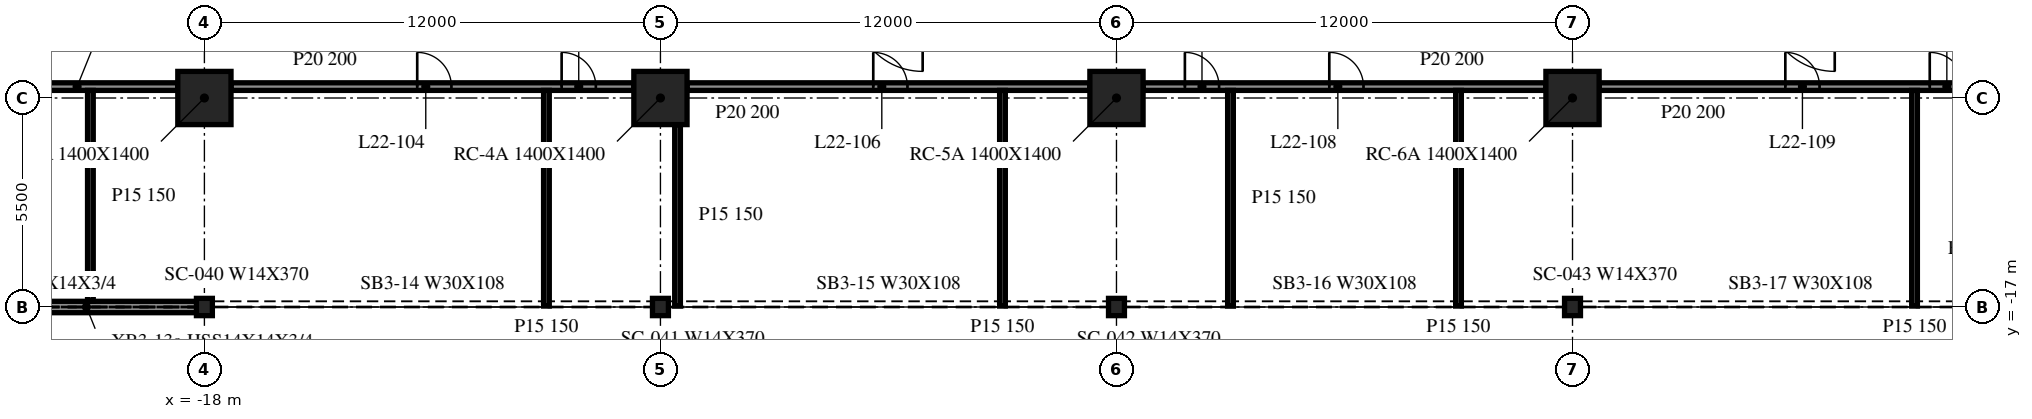
"""IFC4 building model, lengths in metres.
Left out: names, types, materials, properties, quantities, classifications, styles, units other than length and angle.
Written with IfcOpenShell. Run it as: python <this file> out.ifc"""

import sys

from ifc_helpers import new_model, si_unit, direction, frame, frame_2d, origin, origin_2d, place, context, subcontext, project, spatial, rectangle, i_section, extrude, element, fill, save


model = new_model("IFC4")
c1 = context("Model", 3, precision=1e-05, world=origin(), true_north=direction((0.0, 1.0)))
c2 = subcontext(c1, "Body", "Model", "MODEL_VIEW")
j1 = project(units=[si_unit("LENGTHUNIT", "METRE"), si_unit("PLANEANGLEUNIT", "RADIAN")], contexts=[c1])
p1 = place(None, origin())
s1 = spatial("IfcSite", under=j1, at=p1, CompositionType="ELEMENT")
p2 = place(p1, origin())
s2 = spatial("IfcBuilding", under=s1, at=p2, CompositionType="ELEMENT")
p3 = place(p2, frame((0.0, 0.0, 97.1)))
s3 = spatial("IfcBuildingStorey", under=s2, at=p3, CompositionType="ELEMENT", Elevation=97.1)
for number, where, z_axis, x_axis in (
    (1, (-18.0, -11.5, -0.34), (0.0, 0.0, 1.0), (1.0, 0.0, 0.0)),
    (2, (-6.0, -11.5, -0.34), (0.0, 0.0, 1.0), (1.0, 0.0, 0.0)),
    (3, (6.0, -11.5, -0.34), (0.0, 0.0, 1.0), (1.0, 0.0, 0.0)),
    (4, (18.0, -11.5, -0.34), (0.0, 0.0, 1.0), (1.0, 0.0, 0.0)),
):
    element("IfcColumn", number, at=place(p3, frame(where, z_axis=z_axis, x_axis=x_axis)), inside=s3, PredefinedType="COLUMN", context=c2, shape_type="SweptSolid", body=[
        extrude(rectangle(XDim=1.4, YDim=1.4, at=origin_2d()), origin(), (0.0, 0.0, 1.0), 4.1),
    ])
for number, where, z_axis, x_axis in (
    (5, (-18.0, -17.0, -0.34), (0.0, 0.0, 1.0), (1.0, 0.0, 0.0)),
    (6, (-6.0, -17.0, -0.34), (0.0, 0.0, 1.0), (1.0, 0.0, 0.0)),
    (7, (6.0, -17.0, -0.34), (0.0, 0.0, 1.0), (1.0, 0.0, 0.0)),
    (8, (18.0, -17.0, -0.34), (0.0, 0.0, 1.0), (1.0, 0.0, 0.0)),
):
    element("IfcColumn", number, at=place(p3, frame(where, z_axis=z_axis, x_axis=x_axis)), inside=s3, PredefinedType="COLUMN", context=c2, shape_type="SweptSolid", body=[
        extrude(i_section(OverallWidth=0.419, OverallDepth=0.455, WebThickness=0.042, FlangeThickness=0.068, at=origin_2d()), origin(), (0.0, 0.0, 1.0), 4.1),
    ])
p4 = place(p3, frame((-29.979, -17.0, 0.0), z_axis=(0.0, 0.0, 1.0), x_axis=(1.0, 0.0, 0.0)))
e9 = element("IfcWall", 9, at=p4, inside=s3, PredefinedType="NOTDEFINED", context=c2, shape_type="SweptSolid", body=[
    extrude(rectangle(XDim=11.958, YDim=0.3, at=frame_2d((5.979, 0.0))), origin(), (0.0, 0.0, 1.0), 3.003),
])
p5 = place(p3, frame((-29.3, -11.2, 0.0), z_axis=(0.0, 0.0, 1.0), x_axis=(1.0, 0.0, 0.0)))
e10 = element("IfcWall", 10, at=p5, inside=s3, PredefinedType="PARTITIONING", context=c2, shape_type="SweptSolid", body=[
    extrude(rectangle(XDim=10.6, YDim=0.2, at=frame_2d((5.3, 0.0))), origin(), (0.0, 0.0, 1.0), 3.76),
])
p6 = place(p5, frame((1.5, 0.0, 0.0)))
e11 = element("IfcOpeningElement", 11, at=p6, cuts=e10, PredefinedType="OPENING", context=c2, shape_type="SweptSolid", body=[
    extrude(rectangle(XDim=0.9, YDim=2.1, at=frame_2d((0.45, 1.05))), frame((0.0, 0.11, 0.0), z_axis=(0.0, -1.0, 0.0), x_axis=(1.0, 0.0, 0.0)), (0.0, 0.0, 1.0), 0.22),
])
p7 = place(p5, frame((4.9, 0.0, 0.0)))
e12 = element("IfcOpeningElement", 12, at=p7, cuts=e10, PredefinedType="OPENING", context=c2, shape_type="SweptSolid", body=[
    extrude(rectangle(XDim=0.9, YDim=2.1, at=frame_2d((0.45, 1.05))), frame((0.0, 0.11, 0.0), z_axis=(0.0, -1.0, 0.0), x_axis=(1.0, 0.0, 0.0)), (0.0, 0.0, 1.0), 0.22),
])
p8 = place(p3, frame((-17.3, -11.2, 0.0), z_axis=(0.0, 0.0, 1.0), x_axis=(1.0, 0.0, 0.0)))
e13 = element("IfcWall", 13, at=p8, inside=s3, PredefinedType="PARTITIONING", context=c2, shape_type="SweptSolid", body=[
    extrude(rectangle(XDim=10.6, YDim=0.2, at=frame_2d((5.3, 0.0))), origin(), (0.0, 0.0, 1.0), 3.76),
])
p9 = place(p8, frame((4.9, 0.0, 0.0)))
e14 = element("IfcOpeningElement", 14, at=p9, cuts=e13, PredefinedType="OPENING", context=c2, shape_type="SweptSolid", body=[
    extrude(rectangle(XDim=0.9, YDim=2.1, at=frame_2d((0.45, 1.05))), frame((0.0, 0.11, 0.0), z_axis=(0.0, -1.0, 0.0), x_axis=(1.0, 0.0, 0.0)), (0.0, 0.0, 1.0), 0.22),
])
p10 = place(p8, frame((8.7, 0.0, 0.0)))
e15 = element("IfcOpeningElement", 15, at=p10, cuts=e13, PredefinedType="OPENING", context=c2, shape_type="SweptSolid", body=[
    extrude(rectangle(XDim=0.9, YDim=2.1, at=frame_2d((0.45, 1.05))), frame((0.0, 0.11, 0.0), z_axis=(0.0, -1.0, 0.0), x_axis=(1.0, 0.0, 0.0)), (0.0, 0.0, 1.0), 0.22),
])
p11 = place(p3, frame((-5.3, -11.2, 0.0), z_axis=(0.0, 0.0, 1.0), x_axis=(1.0, 0.0, 0.0)))
e16 = element("IfcWall", 16, at=p11, inside=s3, PredefinedType="PARTITIONING", context=c2, shape_type="SweptSolid", body=[
    extrude(rectangle(XDim=10.6, YDim=0.2, at=frame_2d((5.3, 0.0))), origin(), (0.0, 0.0, 1.0), 3.76),
])
p12 = place(p11, frame((4.9, 0.0, 0.0)))
e17 = element("IfcOpeningElement", 17, at=p12, cuts=e16, PredefinedType="OPENING", context=c2, shape_type="SweptSolid", body=[
    extrude(rectangle(XDim=0.9, YDim=2.1, at=frame_2d((0.45, 1.05))), frame((0.0, 0.11, 0.0), z_axis=(0.0, -1.0, 0.0), x_axis=(1.0, 0.0, 0.0)), (0.0, 0.0, 1.0), 0.22),
])
p13 = place(p3, frame((6.7, -11.2, 0.0), z_axis=(0.0, 0.0, 1.0), x_axis=(1.0, 0.0, 0.0)))
e18 = element("IfcWall", 18, at=p13, inside=s3, PredefinedType="PARTITIONING", context=c2, shape_type="SweptSolid", body=[
    extrude(rectangle(XDim=10.6, YDim=0.2, at=frame_2d((5.3, 0.0))), origin(), (0.0, 0.0, 1.0), 3.76),
])
p14 = place(p13, frame((1.1, 0.0, 0.0)))
e19 = element("IfcOpeningElement", 19, at=p14, cuts=e18, PredefinedType="OPENING", context=c2, shape_type="SweptSolid", body=[
    extrude(rectangle(XDim=0.9, YDim=2.1, at=frame_2d((0.45, 1.05))), frame((0.0, 0.11, 0.0), z_axis=(0.0, -1.0, 0.0), x_axis=(1.0, 0.0, 0.0)), (0.0, 0.0, 1.0), 0.22),
])
p15 = place(p13, frame((4.9, 0.0, 0.0)))
e20 = element("IfcOpeningElement", 20, at=p15, cuts=e18, PredefinedType="OPENING", context=c2, shape_type="SweptSolid", body=[
    extrude(rectangle(XDim=0.9, YDim=2.1, at=frame_2d((0.45, 1.05))), frame((0.0, 0.11, 0.0), z_axis=(0.0, -1.0, 0.0), x_axis=(1.0, 0.0, 0.0)), (0.0, 0.0, 1.0), 0.22),
])
p16 = place(p3, frame((18.7, -11.2, 0.0), z_axis=(0.0, 0.0, 1.0), x_axis=(1.0, 0.0, 0.0)))
e21 = element("IfcWall", 21, at=p16, inside=s3, PredefinedType="PARTITIONING", context=c2, shape_type="SweptSolid", body=[
    extrude(rectangle(XDim=10.6, YDim=0.2, at=frame_2d((5.3, 0.0))), origin(), (0.0, 0.0, 1.0), 3.76),
])
p17 = place(p16, frame((4.9, 0.0, 0.0)))
e22 = element("IfcOpeningElement", 22, at=p17, cuts=e21, PredefinedType="OPENING", context=c2, shape_type="SweptSolid", body=[
    extrude(rectangle(XDim=0.9, YDim=2.1, at=frame_2d((0.45, 1.05))), frame((0.0, 0.11, 0.0), z_axis=(0.0, -1.0, 0.0), x_axis=(1.0, 0.0, 0.0)), (0.0, 0.0, 1.0), 0.22),
])
p18 = place(p16, frame((8.7, 0.0, 0.0)))
e23 = element("IfcOpeningElement", 23, at=p18, cuts=e21, PredefinedType="OPENING", context=c2, shape_type="SweptSolid", body=[
    extrude(rectangle(XDim=0.9, YDim=2.1, at=frame_2d((0.45, 1.05))), frame((0.0, 0.11, 0.0), z_axis=(0.0, -1.0, 0.0), x_axis=(1.0, 0.0, 0.0)), (0.0, 0.0, 1.0), 0.22),
])
p19 = place(p3, frame((-21.0, -16.85, 0.0), z_axis=(0.0, 0.0, 1.0), x_axis=(0.0, 1.0, 0.0)))
e24 = element("IfcWall", 24, at=p19, inside=s3, PredefinedType="PARTITIONING", context=c2, shape_type="SweptSolid", body=[
    extrude(rectangle(XDim=5.55, YDim=0.15, at=frame_2d((2.775, 0.0))), origin(), (0.0, 0.0, 1.0), 3.76),
])
p20 = place(p3, frame((-9.0, -16.975, 0.0), z_axis=(0.0, 0.0, 1.0), x_axis=(0.0, 1.0, 0.0)))
e25 = element("IfcWall", 25, at=p20, inside=s3, PredefinedType="PARTITIONING", context=c2, shape_type="SweptSolid", body=[
    extrude(rectangle(XDim=5.675, YDim=0.15, at=frame_2d((2.837, 0.0))), origin(), (0.0, 0.0, 1.0), 3.76),
])
p21 = place(p3, frame((-5.55, -16.975, 0.0), z_axis=(0.0, 0.0, 1.0), x_axis=(0.0, 1.0, 0.0)))
e26 = element("IfcWall", 26, at=p21, inside=s3, PredefinedType="PARTITIONING", context=c2, shape_type="SweptSolid", body=[
    extrude(rectangle(XDim=4.775, YDim=0.15, at=frame_2d((2.388, 0.0))), origin(), (0.0, 0.0, 1.0), 3.76),
])
for number, where, z_axis, x_axis in (
    (27, (3.0, -16.975, 0.0), (0.0, 0.0, 1.0), (0.0, 1.0, 0.0)),
    (28, (9.0, -16.975, 0.0), (0.0, 0.0, 1.0), (0.0, 1.0, 0.0)),
    (29, (15.0, -16.975, 0.0), (0.0, 0.0, 1.0), (0.0, 1.0, 0.0)),
    (30, (27.0, -16.975, 0.0), (0.0, 0.0, 1.0), (0.0, 1.0, 0.0)),
):
    element("IfcWall", number, at=place(p3, frame(where, z_axis=z_axis, x_axis=x_axis)), inside=s3, PredefinedType="PARTITIONING", context=c2, shape_type="SweptSolid", body=[
        extrude(rectangle(XDim=5.675, YDim=0.15, at=frame_2d((2.837, 0.0))), origin(), (0.0, 0.0, 1.0), 3.76),
    ])
p22 = place(p9, origin())
e31 = element("IfcDoor", 31, at=p22, inside=s3, OperationType="SINGLE_SWING_LEFT", PredefinedType="DOOR", context=c2, shape_type="SweptSolid", body=[
    extrude(rectangle(XDim=0.9, YDim=2.1, at=frame_2d((0.45, 1.05))), frame((0.0, 0.025, 0.0), z_axis=(0.0, -1.0, 0.0), x_axis=(1.0, 0.0, 0.0)), (0.0, 0.0, 1.0), 0.05),
])
fill(e14, e31)
p23 = place(p10, origin())
e32 = element("IfcDoor", 32, at=p23, inside=s3, OperationType="SINGLE_SWING_LEFT", PredefinedType="DOOR", context=c2, shape_type="SweptSolid", body=[
    extrude(rectangle(XDim=0.9, YDim=2.1, at=frame_2d((0.45, 1.05))), frame((0.0, 0.025, 0.0), z_axis=(0.0, -1.0, 0.0), x_axis=(1.0, 0.0, 0.0)), (0.0, 0.0, 1.0), 0.05),
])
fill(e15, e32)
p24 = place(p12, origin())
e33 = element("IfcDoor", 33, at=p24, inside=s3, OperationType="SINGLE_SWING_LEFT", PredefinedType="DOOR", context=c2, shape_type="SweptSolid", body=[
    extrude(rectangle(XDim=0.9, YDim=2.1, at=frame_2d((0.45, 1.05))), frame((0.0, 0.025, 0.0), z_axis=(0.0, -1.0, 0.0), x_axis=(1.0, 0.0, 0.0)), (0.0, 0.0, 1.0), 0.05),
])
fill(e17, e33)
p25 = place(p14, origin())
e34 = element("IfcDoor", 34, at=p25, inside=s3, OperationType="SINGLE_SWING_RIGHT", PredefinedType="DOOR", context=c2, shape_type="SweptSolid", body=[
    extrude(rectangle(XDim=0.9, YDim=2.1, at=frame_2d((0.45, 1.05))), frame((0.0, 0.025, 0.0), z_axis=(0.0, -1.0, 0.0), x_axis=(1.0, 0.0, 0.0)), (0.0, 0.0, 1.0), 0.05),
])
fill(e19, e34)
p26 = place(p15, origin())
e35 = element("IfcDoor", 35, at=p26, inside=s3, OperationType="SINGLE_SWING_LEFT", PredefinedType="DOOR", context=c2, shape_type="SweptSolid", body=[
    extrude(rectangle(XDim=0.9, YDim=2.1, at=frame_2d((0.45, 1.05))), frame((0.0, 0.025, 0.0), z_axis=(0.0, -1.0, 0.0), x_axis=(1.0, 0.0, 0.0)), (0.0, 0.0, 1.0), 0.05),
])
fill(e20, e35)
p27 = place(p17, origin())
e36 = element("IfcDoor", 36, at=p27, inside=s3, OperationType="SINGLE_SWING_LEFT", PredefinedType="DOOR", context=c2, shape_type="SweptSolid", body=[
    extrude(rectangle(XDim=0.9, YDim=2.1, at=frame_2d((0.45, 1.05))), frame((0.0, 0.025, 0.0), z_axis=(0.0, -1.0, 0.0), x_axis=(1.0, 0.0, 0.0)), (0.0, 0.0, 1.0), 0.05),
])
fill(e22, e36)
p28 = place(p18, origin())
e37 = element("IfcDoor", 37, at=p28, inside=s3, OperationType="SINGLE_SWING_LEFT", PredefinedType="DOOR", context=c2, shape_type="SweptSolid", body=[
    extrude(rectangle(XDim=0.9, YDim=2.1, at=frame_2d((0.45, 1.05))), frame((0.0, 0.025, 0.0), z_axis=(0.0, -1.0, 0.0), x_axis=(1.0, 0.0, 0.0)), (0.0, 0.0, 1.0), 0.05),
])
fill(e23, e37)
save(model, sys.argv[1])
